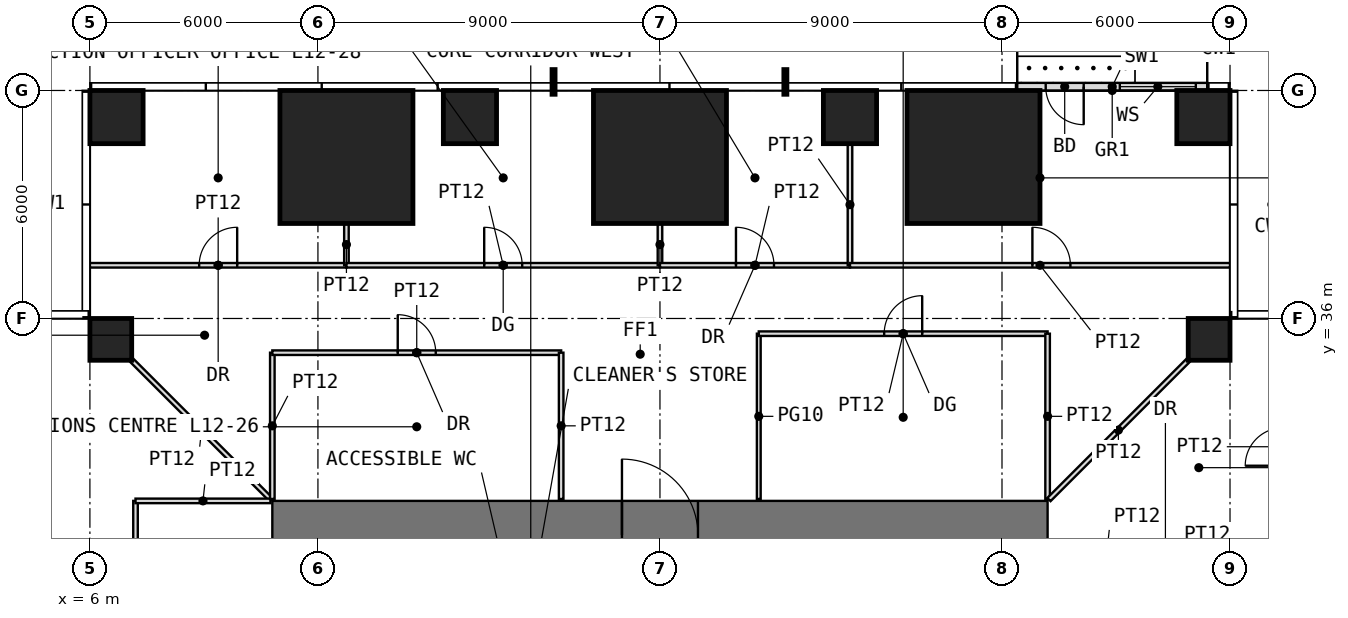
"""IFC4 building model, lengths in metres.
Left out: names, types, materials, properties, quantities, classifications, styles, units other than length and angle.
Written with IfcOpenShell. Run it as: python <this file> out.ifc"""

import sys

from ifc_helpers import new_model, si_unit, direction, frame, frame_2d, origin, origin_2d, place, context, subcontext, project, spatial, rectangle, extrude, element, fill, save


model = new_model("IFC4")
c1 = context("Model", 3, precision=1e-05, world=origin(), true_north=direction((0.0, 1.0)))
c2 = subcontext(c1, "Body", "Model", "MODEL_VIEW")
j1 = project(units=[si_unit("LENGTHUNIT", "METRE"), si_unit("PLANEANGLEUNIT", "RADIAN")], contexts=[c1])
p1 = place(None, origin())
s1 = spatial("IfcSite", under=j1, at=p1, CompositionType="ELEMENT")
p2 = place(p1, origin())
s2 = spatial("IfcBuilding", under=s1, at=p2, CompositionType="ELEMENT")
p3 = place(p2, frame((0.0, 0.0, 54.5)))
s3 = spatial("IfcBuildingStorey", under=s2, at=p3, CompositionType="ELEMENT", Elevation=54.5)
for number, where, z_axis, x_axis in (
    (1, (6.55, 35.45, 0.0), (0.0, 0.0, 1.0), (1.0, 0.0, 0.0)),
    (2, (35.45, 35.45, 0.0), (0.0, 0.0, 1.0), (1.0, 0.0, 0.0)),
):
    element("IfcColumn", number, at=place(p3, frame(where, z_axis=z_axis, x_axis=x_axis)), inside=s3, PredefinedType="COLUMN", context=c2, shape_type="SweptSolid", body=[
        extrude(rectangle(XDim=1.1, YDim=1.1, at=origin_2d()), origin(), (0.0, 0.0, 1.0), 4.0),
    ])
p4 = place(p3, frame((6.7, 41.3, 0.0), z_axis=(0.0, 0.0, 1.0), x_axis=(1.0, 0.0, 0.0)))
e3 = element("IfcColumn", 3, at=p4, inside=s3, PredefinedType="COLUMN", context=c2, shape_type="SweptSolid", body=[
    extrude(rectangle(XDim=1.4, YDim=1.4, at=origin_2d()), origin(), (0.0, 0.0, 1.0), 4.0),
])
p5 = place(p3, frame((12.75, 40.25, 0.0), z_axis=(0.0, 0.0, 1.0), x_axis=(1.0, 0.0, 0.0)))
e4 = element("IfcColumn", 4, at=p5, inside=s3, PredefinedType="COLUMN", context=c2, shape_type="SweptSolid", body=[
    extrude(rectangle(XDim=3.5, YDim=3.5, at=origin_2d()), origin(), (0.0, 0.0, 1.0), 4.0),
])
p6 = place(p3, frame((16.0, 41.3, 0.0), z_axis=(0.0, 0.0, 1.0), x_axis=(1.0, 0.0, 0.0)))
e5 = element("IfcColumn", 5, at=p6, inside=s3, PredefinedType="COLUMN", context=c2, shape_type="SweptSolid", body=[
    extrude(rectangle(XDim=1.4, YDim=1.4, at=origin_2d()), origin(), (0.0, 0.0, 1.0), 4.0),
])
p7 = place(p3, frame((21.0, 40.25, 0.0), z_axis=(0.0, 0.0, 1.0), x_axis=(1.0, 0.0, 0.0)))
e6 = element("IfcColumn", 6, at=p7, inside=s3, PredefinedType="COLUMN", context=c2, shape_type="SweptSolid", body=[
    extrude(rectangle(XDim=3.5, YDim=3.5, at=origin_2d()), origin(), (0.0, 0.0, 1.0), 4.0),
])
p8 = place(p3, frame((26.0, 41.3, 0.0), z_axis=(0.0, 0.0, 1.0), x_axis=(1.0, 0.0, 0.0)))
e7 = element("IfcColumn", 7, at=p8, inside=s3, PredefinedType="COLUMN", context=c2, shape_type="SweptSolid", body=[
    extrude(rectangle(XDim=1.4, YDim=1.4, at=origin_2d()), origin(), (0.0, 0.0, 1.0), 4.0),
])
p9 = place(p3, frame((29.25, 40.25, 0.0), z_axis=(0.0, 0.0, 1.0), x_axis=(1.0, 0.0, 0.0)))
e8 = element("IfcColumn", 8, at=p9, inside=s3, PredefinedType="COLUMN", context=c2, shape_type="SweptSolid", body=[
    extrude(rectangle(XDim=3.5, YDim=3.5, at=origin_2d()), origin(), (0.0, 0.0, 1.0), 4.0),
])
p10 = place(p3, frame((35.3, 41.3, 0.0), z_axis=(0.0, 0.0, 1.0), x_axis=(1.0, 0.0, 0.0)))
e9 = element("IfcColumn", 9, at=p10, inside=s3, PredefinedType="COLUMN", context=c2, shape_type="SweptSolid", body=[
    extrude(rectangle(XDim=1.4, YDim=1.4, at=origin_2d()), origin(), (0.0, 0.0, 1.0), 4.0),
])
p11 = place(p3, frame((35.4, 42.1, 0.0), z_axis=(0.0, 0.0, 1.0), x_axis=(-1.0, 0.0, 0.0)))
e10 = element("IfcWall", 10, at=p11, inside=s3, PredefinedType="USERDEFINED", context=c2, shape_type="SweptSolid", body=[
    extrude(rectangle(XDim=5.0, YDim=0.2, at=frame_2d((2.5, 0.0))), origin(), (0.0, 0.0, 1.0), 3.75),
])
p12 = place(p11, frame((3.25, 0.0, 0.0)))
e11 = element("IfcOpeningElement", 11, at=p12, cuts=e10, PredefinedType="OPENING", context=c2, shape_type="SweptSolid", body=[
    extrude(rectangle(XDim=1.0, YDim=2.4, at=frame_2d((0.5, 1.2))), frame((0.0, 0.11, 0.0), z_axis=(0.0, -1.0, 0.0), x_axis=(1.0, 0.0, 0.0)), (0.0, 0.0, 1.0), 0.22),
])
p13 = place(p11, frame((0.3, 0.0, 0.3)))
e12 = element("IfcOpeningElement", 12, at=p13, cuts=e10, PredefinedType="OPENING", context=c2, shape_type="SweptSolid", body=[
    extrude(rectangle(XDim=2.0, YDim=2.7, at=frame_2d((1.0, 1.35))), frame((0.0, 0.11, 0.0), z_axis=(0.0, -1.0, 0.0), x_axis=(1.0, 0.0, 0.0)), (0.0, 0.0, 1.0), 0.22),
])
p14 = place(p3, frame((10.8, 30.3, -0.05), z_axis=(0.0, 0.0, 1.0), x_axis=(1.0, 0.0, 0.0)))
e13 = element("IfcWall", 13, at=p14, inside=s3, PredefinedType="SHEAR", context=c2, shape_type="SweptSolid", body=[
    extrude(rectangle(XDim=20.4, YDim=1.8, at=frame_2d((10.2, 0.0))), origin(), (0.0, 0.0, 1.0), 4.0),
])
p15 = place(p14, frame((9.2, 0.0, 0.05)))
e14 = element("IfcOpeningElement", 14, at=p15, cuts=e13, PredefinedType="OPENING", context=c2, shape_type="SweptSolid", body=[
    extrude(rectangle(XDim=2.0, YDim=2.2, at=frame_2d((1.0, 1.1))), frame((0.0, 0.91, 0.0), z_axis=(0.0, -1.0, 0.0), x_axis=(1.0, 0.0, 0.0)), (0.0, 0.0, 1.0), 1.82),
])
p16 = place(p3, frame((6.0, 37.4, 0.0), z_axis=(0.0, 0.0, 1.0), x_axis=(1.0, 0.0, 0.0)))
e15 = element("IfcWall", 15, at=p16, inside=s3, PredefinedType="PARTITIONING", context=c2, shape_type="SweptSolid", body=[
    extrude(rectangle(XDim=6.75, YDim=0.12, at=frame_2d((3.375, 0.0))), origin(), (0.0, 0.0, 1.0), 3.75),
])
p17 = place(p16, frame((2.875, 0.0, 0.0)))
e16 = element("IfcOpeningElement", 16, at=p17, cuts=e15, PredefinedType="OPENING", context=c2, shape_type="SweptSolid", body=[
    extrude(rectangle(XDim=1.0, YDim=2.2, at=frame_2d((0.5, 1.1))), frame((0.0, 0.07, 0.0), z_axis=(0.0, -1.0, 0.0), x_axis=(1.0, 0.0, 0.0)), (0.0, 0.0, 1.0), 0.14),
])
p18 = place(p3, frame((7.11, 34.89, 0.0), z_axis=(0.0, 0.0, 1.0), x_axis=(0.707106781187, -0.707106781187, 0.0)))
e17 = element("IfcWall", 17, at=p18, inside=s3, PredefinedType="PARTITIONING", context=c2, shape_type="SweptSolid", body=[
    extrude(rectangle(XDim=5.168, YDim=0.12, at=frame_2d((2.584, 0.0))), origin(), (0.0, 0.0, 1.0), 3.75),
])
p19 = place(p3, frame((7.2, 24.6, 0.0), z_axis=(0.0, 0.0, 1.0), x_axis=(0.0, 1.0, 0.0)))
e18 = element("IfcWall", 18, at=p19, inside=s3, PredefinedType="PARTITIONING", context=c2, shape_type="SweptSolid", body=[
    extrude(rectangle(XDim=6.6, YDim=0.12, at=frame_2d((3.3, 0.0))), origin(), (0.0, 0.0, 1.0), 3.75),
])
p20 = place(p19, frame((2.8, 0.0, 0.0)))
e19 = element("IfcOpeningElement", 19, at=p20, cuts=e18, PredefinedType="OPENING", context=c2, shape_type="SweptSolid", body=[
    extrude(rectangle(XDim=1.0, YDim=2.4, at=frame_2d((0.5, 1.2))), frame((0.0, 0.07, 0.0), z_axis=(0.0, -1.0, 0.0), x_axis=(1.0, 0.0, 0.0)), (0.0, 0.0, 1.0), 0.14),
])
p21 = place(p3, frame((7.2, 31.2, 0.0), z_axis=(0.0, 0.0, 1.0), x_axis=(1.0, 0.0, 0.0)))
e20 = element("IfcWall", 20, at=p21, inside=s3, PredefinedType="PARTITIONING", context=c2, shape_type="SweptSolid", body=[
    extrude(rectangle(XDim=3.55, YDim=0.12, at=frame_2d((1.775, 0.0))), origin(), (0.0, 0.0, 1.0), 3.75),
])
p22 = place(p3, frame((10.8, 31.25, 0.0), z_axis=(0.0, 0.0, 1.0), x_axis=(0.0, 1.0, 0.0)))
e21 = element("IfcWall", 21, at=p22, inside=s3, PredefinedType="PARTITIONING", context=c2, shape_type="SweptSolid", body=[
    extrude(rectangle(XDim=3.85, YDim=0.12, at=frame_2d((1.925, 0.0))), origin(), (0.0, 0.0, 1.0), 3.75),
])
p23 = place(p3, frame((10.8, 35.1, 0.0), z_axis=(0.0, 0.0, 1.0), x_axis=(1.0, 0.0, 0.0)))
e22 = element("IfcWall", 22, at=p23, inside=s3, PredefinedType="PARTITIONING", context=c2, shape_type="SweptSolid", body=[
    extrude(rectangle(XDim=7.6, YDim=0.12, at=frame_2d((3.8, 0.0))), origin(), (0.0, 0.0, 1.0), 3.75),
])
p24 = place(p23, frame((3.3, 0.0, 0.0)))
e23 = element("IfcOpeningElement", 23, at=p24, cuts=e22, PredefinedType="OPENING", context=c2, shape_type="SweptSolid", body=[
    extrude(rectangle(XDim=1.0, YDim=2.2, at=frame_2d((0.5, 1.1))), frame((0.0, 0.07, 0.0), z_axis=(0.0, -1.0, 0.0), x_axis=(1.0, 0.0, 0.0)), (0.0, 0.0, 1.0), 0.14),
])
p25 = place(p3, frame((12.75, 37.4, 0.0), z_axis=(0.0, 0.0, 1.0), x_axis=(0.0, 1.0, 0.0)))
e24 = element("IfcWall", 24, at=p25, inside=s3, PredefinedType="PARTITIONING", context=c2, shape_type="SweptSolid", body=[
    extrude(rectangle(XDim=1.09, YDim=0.12, at=frame_2d((0.545, 0.0))), origin(), (0.0, 0.0, 1.0), 3.75),
])
p26 = place(p3, frame((12.75, 37.4, 0.0), z_axis=(0.0, 0.0, 1.0), x_axis=(1.0, 0.0, 0.0)))
e25 = element("IfcWall", 25, at=p26, inside=s3, PredefinedType="PARTITIONING", context=c2, shape_type="SweptSolid", body=[
    extrude(rectangle(XDim=8.25, YDim=0.12, at=frame_2d((4.125, 0.0))), origin(), (0.0, 0.0, 1.0), 3.75),
])
p27 = place(p26, frame((3.625, 0.0, 0.0)))
e26 = element("IfcOpeningElement", 26, at=p27, cuts=e25, PredefinedType="OPENING", context=c2, shape_type="SweptSolid", body=[
    extrude(rectangle(XDim=1.0, YDim=2.4, at=frame_2d((0.5, 1.2))), frame((0.0, 0.07, 0.0), z_axis=(0.0, -1.0, 0.0), x_axis=(1.0, 0.0, 0.0)), (0.0, 0.0, 1.0), 0.14),
])
p28 = place(p3, frame((18.4, 31.25, 0.0), z_axis=(0.0, 0.0, 1.0), x_axis=(0.0, 1.0, 0.0)))
e27 = element("IfcWall", 27, at=p28, inside=s3, PredefinedType="PARTITIONING", context=c2, shape_type="SweptSolid", body=[
    extrude(rectangle(XDim=3.85, YDim=0.12, at=frame_2d((1.925, 0.0))), origin(), (0.0, 0.0, 1.0), 3.75),
])
p29 = place(p3, frame((21.0, 37.4, 0.0), z_axis=(0.0, 0.0, 1.0), x_axis=(0.0, 1.0, 0.0)))
e28 = element("IfcWall", 28, at=p29, inside=s3, PredefinedType="PARTITIONING", context=c2, shape_type="SweptSolid", body=[
    extrude(rectangle(XDim=1.09, YDim=0.12, at=frame_2d((0.545, 0.0))), origin(), (0.0, 0.0, 1.0), 3.75),
])
p30 = place(p3, frame((21.0, 37.4, 0.0), z_axis=(0.0, 0.0, 1.0), x_axis=(1.0, 0.0, 0.0)))
e29 = element("IfcWall", 29, at=p30, inside=s3, PredefinedType="PARTITIONING", context=c2, shape_type="SweptSolid", body=[
    extrude(rectangle(XDim=5.0, YDim=0.12, at=frame_2d((2.5, 0.0))), origin(), (0.0, 0.0, 1.0), 3.75),
])
p31 = place(p30, frame((2.0, 0.0, 0.0)))
e30 = element("IfcOpeningElement", 30, at=p31, cuts=e29, PredefinedType="OPENING", context=c2, shape_type="SweptSolid", body=[
    extrude(rectangle(XDim=1.0, YDim=2.2, at=frame_2d((0.5, 1.1))), frame((0.0, 0.07, 0.0), z_axis=(0.0, -1.0, 0.0), x_axis=(1.0, 0.0, 0.0)), (0.0, 0.0, 1.0), 0.14),
])
p32 = place(p3, frame((23.6, 31.25, 0.0), z_axis=(0.0, 0.0, 1.0), x_axis=(0.0, 1.0, 0.0)))
e31 = element("IfcWall", 31, at=p32, inside=s3, PredefinedType="PARTITIONING", context=c2, shape_type="SweptSolid", body=[
    extrude(rectangle(XDim=4.35, YDim=0.1, at=frame_2d((2.175, 0.0))), origin(), (0.0, 0.0, 1.0), 3.75),
])
p33 = place(p3, frame((23.6, 35.6, 0.0), z_axis=(0.0, 0.0, 1.0), x_axis=(1.0, 0.0, 0.0)))
e32 = element("IfcWall", 32, at=p33, inside=s3, PredefinedType="PARTITIONING", context=c2, shape_type="SweptSolid", body=[
    extrude(rectangle(XDim=7.6, YDim=0.12, at=frame_2d((3.8, 0.0))), origin(), (0.0, 0.0, 1.0), 3.75),
])
p34 = place(p33, frame((3.3, 0.0, 0.0)))
e33 = element("IfcOpeningElement", 33, at=p34, cuts=e32, PredefinedType="OPENING", context=c2, shape_type="SweptSolid", body=[
    extrude(rectangle(XDim=1.0, YDim=2.4, at=frame_2d((0.5, 1.2))), frame((0.0, 0.07, 0.0), z_axis=(0.0, -1.0, 0.0), x_axis=(1.0, 0.0, 0.0)), (0.0, 0.0, 1.0), 0.14),
])
p35 = place(p3, frame((26.0, 37.4, 0.0), z_axis=(0.0, 0.0, 1.0), x_axis=(0.0, 1.0, 0.0)))
e34 = element("IfcWall", 34, at=p35, inside=s3, PredefinedType="PARTITIONING", context=c2, shape_type="SweptSolid", body=[
    extrude(rectangle(XDim=3.19, YDim=0.12, at=frame_2d((1.595, 0.0))), origin(), (0.0, 0.0, 1.0), 3.75),
])
p36 = place(p3, frame((26.0, 37.4, 0.0), z_axis=(0.0, 0.0, 1.0), x_axis=(1.0, 0.0, 0.0)))
e35 = element("IfcWall", 35, at=p36, inside=s3, PredefinedType="PARTITIONING", context=c2, shape_type="SweptSolid", body=[
    extrude(rectangle(XDim=10.0, YDim=0.12, at=frame_2d((5.0, 0.0))), origin(), (0.0, 0.0, 1.0), 3.75),
])
p37 = place(p36, frame((4.8, 0.0, 0.0)))
e36 = element("IfcOpeningElement", 36, at=p37, cuts=e35, PredefinedType="OPENING", context=c2, shape_type="SweptSolid", body=[
    extrude(rectangle(XDim=1.0, YDim=2.4, at=frame_2d((0.5, 1.2))), frame((0.0, 0.07, 0.0), z_axis=(0.0, -1.0, 0.0), x_axis=(1.0, 0.0, 0.0)), (0.0, 0.0, 1.0), 0.14),
])
p38 = place(p3, frame((31.2, 31.25, 0.0), z_axis=(0.0, 0.0, 1.0), x_axis=(0.0, 1.0, 0.0)))
e37 = element("IfcWall", 37, at=p38, inside=s3, PredefinedType="PARTITIONING", context=c2, shape_type="SweptSolid", body=[
    extrude(rectangle(XDim=4.35, YDim=0.12, at=frame_2d((2.175, 0.0))), origin(), (0.0, 0.0, 1.0), 3.75),
])
p39 = place(p3, frame((31.235, 31.235, 0.0), z_axis=(0.0, 0.0, 1.0), x_axis=(0.707106781187, 0.707106781187, 0.0)))
e38 = element("IfcWall", 38, at=p39, inside=s3, PredefinedType="PARTITIONING", context=c2, shape_type="SweptSolid", body=[
    extrude(rectangle(XDim=5.168, YDim=0.12, at=frame_2d((2.584, 0.0))), origin(), (0.0, 0.0, 1.0), 3.75),
])
p40 = place(p12, origin())
e39 = element("IfcDoor", 39, at=p40, inside=s3, OperationType="SINGLE_SWING_LEFT", PredefinedType="DOOR", context=c2, shape_type="SweptSolid", body=[
    extrude(rectangle(XDim=1.0, YDim=2.4, at=frame_2d((0.5, 1.2))), frame((0.0, 0.025, 0.0), z_axis=(0.0, -1.0, 0.0), x_axis=(1.0, 0.0, 0.0)), (0.0, 0.0, 1.0), 0.05),
])
fill(e11, e39)
p41 = place(p13, origin())
e40 = element("IfcWindow", 40, at=p41, inside=s3, PartitioningType="SINGLE_PANEL", PredefinedType="WINDOW", context=c2, shape_type="SweptSolid", body=[
    extrude(rectangle(XDim=2.0, YDim=2.7, at=frame_2d((1.0, 1.35))), frame((0.0, 0.03, 0.0), z_axis=(0.0, -1.0, 0.0), x_axis=(1.0, 0.0, 0.0)), (0.0, 0.0, 1.0), 0.06),
])
fill(e12, e40)
p42 = place(p15, origin())
e41 = element("IfcDoor", 41, at=p42, inside=s3, OperationType="DOUBLE_DOOR_SINGLE_SWING", PredefinedType="DOOR", context=c2, shape_type="SweptSolid", body=[
    extrude(rectangle(XDim=2.0, YDim=2.2, at=frame_2d((1.0, 1.1))), frame((0.0, 0.025, 0.0), z_axis=(0.0, -1.0, 0.0), x_axis=(1.0, 0.0, 0.0)), (0.0, 0.0, 1.0), 0.05),
])
fill(e14, e41)
p43 = place(p24, origin())
e42 = element("IfcDoor", 42, at=p43, inside=s3, OperationType="SINGLE_SWING_LEFT", PredefinedType="DOOR", context=c2, shape_type="SweptSolid", body=[
    extrude(rectangle(XDim=1.0, YDim=2.2, at=frame_2d((0.5, 1.1))), frame((0.0, 0.025, 0.0), z_axis=(0.0, -1.0, 0.0), x_axis=(1.0, 0.0, 0.0)), (0.0, 0.0, 1.0), 0.05),
])
fill(e23, e42)
p44 = place(p34, origin())
e43 = element("IfcDoor", 43, at=p44, inside=s3, OperationType="SINGLE_SWING_RIGHT", PredefinedType="DOOR", context=c2, shape_type="SweptSolid", body=[
    extrude(rectangle(XDim=1.0, YDim=2.4, at=frame_2d((0.5, 1.2))), frame((0.0, 0.025, 0.0), z_axis=(0.0, -1.0, 0.0), x_axis=(1.0, 0.0, 0.0)), (0.0, 0.0, 1.0), 0.05),
])
fill(e33, e43)
p45 = place(p17, origin())
e44 = element("IfcDoor", 44, at=p45, inside=s3, OperationType="SINGLE_SWING_RIGHT", PredefinedType="DOOR", context=c2, shape_type="SweptSolid", body=[
    extrude(rectangle(XDim=1.0, YDim=2.2, at=frame_2d((0.5, 1.1))), frame((0.0, 0.025, 0.0), z_axis=(0.0, -1.0, 0.0), x_axis=(1.0, 0.0, 0.0)), (0.0, 0.0, 1.0), 0.05),
])
fill(e16, e44)
p46 = place(p31, origin())
e45 = element("IfcDoor", 45, at=p46, inside=s3, OperationType="SINGLE_SWING_LEFT", PredefinedType="DOOR", context=c2, shape_type="SweptSolid", body=[
    extrude(rectangle(XDim=1.0, YDim=2.2, at=frame_2d((0.5, 1.1))), frame((0.0, 0.025, 0.0), z_axis=(0.0, -1.0, 0.0), x_axis=(1.0, 0.0, 0.0)), (0.0, 0.0, 1.0), 0.05),
])
fill(e30, e45)
p47 = place(p27, origin())
e46 = element("IfcDoor", 46, at=p47, inside=s3, OperationType="SINGLE_SWING_LEFT", PredefinedType="DOOR", context=c2, shape_type="SweptSolid", body=[
    extrude(rectangle(XDim=1.0, YDim=2.4, at=frame_2d((0.5, 1.2))), frame((0.0, 0.025, 0.0), z_axis=(0.0, -1.0, 0.0), x_axis=(1.0, 0.0, 0.0)), (0.0, 0.0, 1.0), 0.05),
])
fill(e26, e46)
p48 = place(p37, origin())
e47 = element("IfcDoor", 47, at=p48, inside=s3, OperationType="SINGLE_SWING_LEFT", PredefinedType="DOOR", context=c2, shape_type="SweptSolid", body=[
    extrude(rectangle(XDim=1.0, YDim=2.4, at=frame_2d((0.5, 1.2))), frame((0.0, 0.025, 0.0), z_axis=(0.0, -1.0, 0.0), x_axis=(1.0, 0.0, 0.0)), (0.0, 0.0, 1.0), 0.05),
])
fill(e36, e47)
save(model, sys.argv[1])
